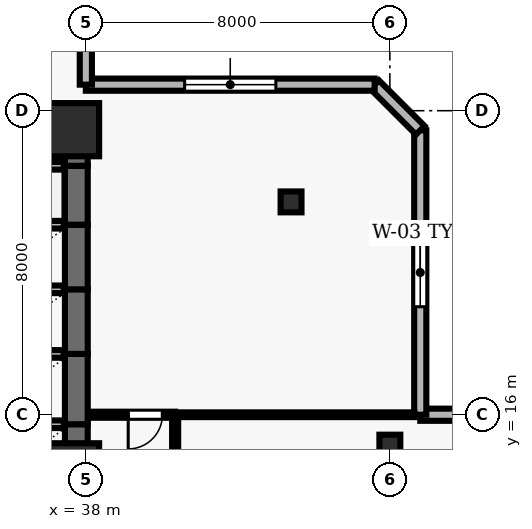
"""IFC4 building model, lengths in metres.
Left out: names, types, materials, properties, quantities, classifications, styles, units other than length and angle.
Written with IfcOpenShell. Run it as: python <this file> out.ifc"""

import sys

from ifc_helpers import new_model, si_unit, direction, frame, frame_2d, origin, origin_2d, place, context, subcontext, project, spatial, rectangle, hollow_rectangle, extrude, element, fill, save


model = new_model("IFC4")
c1 = context("Model", 3, precision=1e-05, world=origin(), true_north=direction((0.0, 1.0)))
c2 = subcontext(c1, "Body", "Model", "MODEL_VIEW")
j1 = project(units=[si_unit("LENGTHUNIT", "METRE"), si_unit("PLANEANGLEUNIT", "RADIAN")], contexts=[c1])
p1 = place(None, origin())
s1 = spatial("IfcSite", under=j1, at=p1, CompositionType="ELEMENT")
p2 = place(p1, origin())
s2 = spatial("IfcBuilding", under=s1, at=p2, CompositionType="ELEMENT")
p3 = place(p2, frame((0.0, 0.0, 89.5)))
s3 = spatial("IfcBuildingStorey", under=s2, at=p3, CompositionType="ELEMENT", Elevation=89.5)
for number, where, z_axis, x_axis in (
    (1, (37.65, 14.55, 0.0), (0.0, 0.0, 1.0), (1.0, 0.0, 0.0)),
    (2, (37.65, 23.5, 0.0), (0.0, 0.0, 1.0), (1.0, 0.0, 0.0)),
):
    element("IfcColumn", number, at=place(p3, frame(where, z_axis=z_axis, x_axis=x_axis)), inside=s3, PredefinedType="COLUMN", context=c2, shape_type="SweptSolid", body=[
        extrude(rectangle(XDim=1.4, YDim=1.4, at=origin_2d()), origin(), (0.0, 0.0, 1.0), 3.9),
    ])
for number, where, z_axis, x_axis in (
    (3, (46.0, 15.2, 0.0), (0.0, 0.0, 1.0), (1.0, 0.0, 0.0)),
    (4, (43.4, 21.6, 0.0), (0.0, 0.0, 1.0), (1.0, 0.0, 0.0)),
):
    element("IfcColumn", number, at=place(p3, frame(where, z_axis=z_axis, x_axis=x_axis)), inside=s3, PredefinedType="COLUMN", context=c2, shape_type="SweptSolid", body=[
        extrude(hollow_rectangle(XDim=0.55, YDim=0.55, WallThickness=0.025, at=origin_2d()), origin(), (0.0, 0.0, 1.0), 3.9),
    ])
p4 = place(p3, frame((73.5, 16.0, 0.0), z_axis=(0.0, 0.0, 1.0), x_axis=(-1.0, 0.0, 0.0)))
e5 = element("IfcWall", 5, at=p4, inside=s3, PredefinedType="SOLIDWALL", context=c2, shape_type="SweptSolid", body=[
    extrude(rectangle(XDim=26.7, YDim=0.32, at=frame_2d((13.35, 0.0))), origin(), (0.0, 0.0, 1.0), 3.64),
])
p5 = place(p4, frame((17.35, 0.0, 0.0)))
e6 = element("IfcOpeningElement", 6, at=p5, cuts=e5, PredefinedType="OPENING", context=c2, shape_type="SweptSolid", body=[
    extrude(rectangle(XDim=1.0, YDim=2.2, at=frame_2d((0.5, 1.1))), frame((0.0, 0.17, 0.0), z_axis=(0.0, -1.0, 0.0), x_axis=(1.0, 0.0, 0.0)), (0.0, 0.0, 1.0), 0.34),
])
p6 = place(p4, frame((2.588, 0.0, 0.9)))
e7 = element("IfcOpeningElement", 7, at=p6, cuts=e5, PredefinedType="OPENING", context=c2, shape_type="SweptSolid", body=[
    extrude(rectangle(XDim=1.5, YDim=1.6, at=frame_2d((0.75, 0.8))), frame((0.0, 0.17, 0.0), z_axis=(0.0, -1.0, 0.0), x_axis=(1.0, 0.0, 0.0)), (0.0, 0.0, 1.0), 0.34),
])
p7 = place(p3, frame((46.8, 16.0, 0.0), z_axis=(0.0, 0.0, 1.0), x_axis=(0.0, 1.0, 0.0)))
e8 = element("IfcWall", 8, at=p7, inside=s3, PredefinedType="SOLIDWALL", context=c2, shape_type="SweptSolid", body=[
    extrude(rectangle(XDim=7.485, YDim=0.32, at=frame_2d((3.743, 0.0))), origin(), (0.0, 0.0, 1.0), 3.64),
])
p8 = place(p7, frame((2.842, 0.0, 0.9)))
e9 = element("IfcOpeningElement", 9, at=p8, cuts=e8, PredefinedType="OPENING", context=c2, shape_type="SweptSolid", body=[
    extrude(rectangle(XDim=1.8, YDim=1.6, at=frame_2d((0.9, 0.8))), frame((0.0, 0.17, 0.0), z_axis=(0.0, -1.0, 0.0), x_axis=(1.0, 0.0, 0.0)), (0.0, 0.0, 1.0), 0.34),
])
p9 = place(p3, frame((46.8, 23.485, 0.0), z_axis=(0.0, 0.0, 1.0), x_axis=(-0.707106781187, 0.707106781187, 0.0)))
e10 = element("IfcWall", 10, at=p9, inside=s3, PredefinedType="SOLIDWALL", context=c2, shape_type="SweptSolid", body=[
    extrude(rectangle(XDim=1.697, YDim=0.32, at=frame_2d((0.849, 0.0))), origin(), (0.0, 0.0, 1.0), 3.64),
])
p10 = place(p3, frame((45.6, 24.685, 0.0), z_axis=(0.0, 0.0, 1.0), x_axis=(-1.0, 0.0, 0.0)))
e11 = element("IfcWall", 11, at=p10, inside=s3, PredefinedType="SOLIDWALL", context=c2, shape_type="SweptSolid", body=[
    extrude(rectangle(XDim=7.6, YDim=0.32, at=frame_2d((3.8, 0.0))), origin(), (0.0, 0.0, 1.0), 3.64),
])
p11 = place(p10, frame((2.6, 0.0, 0.9)))
e12 = element("IfcOpeningElement", 12, at=p11, cuts=e11, PredefinedType="OPENING", context=c2, shape_type="SweptSolid", body=[
    extrude(rectangle(XDim=2.4, YDim=1.6, at=frame_2d((1.2, 0.8))), frame((0.0, 0.17, 0.0), z_axis=(0.0, -1.0, 0.0), x_axis=(1.0, 0.0, 0.0)), (0.0, 0.0, 1.0), 0.34),
])
p12 = place(p3, frame((38.0, 24.685, 0.0), z_axis=(0.0, 0.0, 1.0), x_axis=(0.0, 1.0, 0.0)))
e13 = element("IfcWall", 13, at=p12, inside=s3, PredefinedType="SOLIDWALL", context=c2, shape_type="SweptSolid", body=[
    extrude(rectangle(XDim=26.815, YDim=0.32, at=frame_2d((13.407, 0.0))), origin(), (0.0, 0.0, 1.0), 3.64),
])
p13 = place(p12, frame((13.007, 0.0, 0.0)))
e14 = element("IfcOpeningElement", 14, at=p13, cuts=e13, PredefinedType="OPENING", context=c2, shape_type="SweptSolid", body=[
    extrude(rectangle(XDim=1.0, YDim=2.2, at=frame_2d((0.5, 1.1))), frame((0.0, 0.17, 0.0), z_axis=(0.0, -1.0, 0.0), x_axis=(1.0, 0.0, 0.0)), (0.0, 0.0, 1.0), 0.34),
])
p14 = place(p12, frame((2.602, 0.0, 0.9)))
e15 = element("IfcOpeningElement", 15, at=p14, cuts=e13, PredefinedType="OPENING", context=c2, shape_type="SweptSolid", body=[
    extrude(rectangle(XDim=1.5, YDim=1.8, at=frame_2d((0.75, 0.9))), frame((0.0, 0.17, 0.0), z_axis=(0.0, -1.0, 0.0), x_axis=(1.0, 0.0, 0.0)), (0.0, 0.0, 1.0), 0.34),
])
p15 = place(p12, frame((8.856, 0.0, 0.9)))
e16 = element("IfcOpeningElement", 16, at=p15, cuts=e13, PredefinedType="OPENING", context=c2, shape_type="SweptSolid", body=[
    extrude(rectangle(XDim=1.5, YDim=1.8, at=frame_2d((0.75, 0.9))), frame((0.0, 0.17, 0.0), z_axis=(0.0, -1.0, 0.0), x_axis=(1.0, 0.0, 0.0)), (0.0, 0.0, 1.0), 0.34),
])
p16 = place(p12, frame((22.713, 0.0, 0.9)))
e17 = element("IfcOpeningElement", 17, at=p16, cuts=e13, PredefinedType="OPENING", context=c2, shape_type="SweptSolid", body=[
    extrude(rectangle(XDim=1.5, YDim=1.8, at=frame_2d((0.75, 0.9))), frame((0.0, 0.17, 0.0), z_axis=(0.0, -1.0, 0.0), x_axis=(1.0, 0.0, 0.0)), (0.0, 0.0, 1.0), 0.34),
])
p17 = place(p3, frame((37.75, 13.9, 0.0), z_axis=(0.0, 0.0, 1.0), x_axis=(0.0, 1.0, 0.0)))
e18 = element("IfcWall", 18, at=p17, inside=s3, PredefinedType="SHEAR", context=c2, shape_type="SweptSolid", body=[
    extrude(rectangle(XDim=1.85, YDim=0.6, at=frame_2d((0.925, 0.0))), origin(), (0.0, 0.0, 1.0), 3.64),
])
p18 = place(p3, frame((37.42, 15.75, 0.0), z_axis=(0.0, 0.0, 1.0), x_axis=(-1.0, 0.0, 0.0)))
e19 = element("IfcWall", 19, at=p18, inside=s3, PredefinedType="SOLIDWALL", context=c2, shape_type="SweptSolid", body=[
    extrude(rectangle(XDim=2.14, YDim=0.2, at=frame_2d((1.07, 0.0))), origin(), (0.0, 0.0, 1.0), 3.64),
])
p19 = place(p3, frame((37.75, 15.75, 0.0), z_axis=(0.0, 0.0, 1.0), x_axis=(0.0, 1.0, 0.0)))
e20 = element("IfcWall", 20, at=p19, inside=s3, PredefinedType="SHEAR", context=c2, shape_type="SweptSolid", body=[
    extrude(rectangle(XDim=1.85, YDim=0.6, at=frame_2d((0.925, 0.0))), origin(), (0.0, 0.0, 1.0), 3.64),
])
p20 = place(p3, frame((37.42, 17.6, 0.0), z_axis=(0.0, 0.0, 1.0), x_axis=(-1.0, 0.0, 0.0)))
e21 = element("IfcWall", 21, at=p20, inside=s3, PredefinedType="SOLIDWALL", context=c2, shape_type="SweptSolid", body=[
    extrude(rectangle(XDim=2.14, YDim=0.2, at=frame_2d((1.07, 0.0))), origin(), (0.0, 0.0, 1.0), 3.64),
])
p21 = place(p3, frame((37.75, 17.6, 0.0), z_axis=(0.0, 0.0, 1.0), x_axis=(0.0, 1.0, 0.0)))
e22 = element("IfcWall", 22, at=p21, inside=s3, PredefinedType="SHEAR", context=c2, shape_type="SweptSolid", body=[
    extrude(rectangle(XDim=1.7, YDim=0.6, at=frame_2d((0.85, 0.0))), origin(), (0.0, 0.0, 1.0), 3.64),
])
p22 = place(p3, frame((37.42, 19.3, 0.0), z_axis=(0.0, 0.0, 1.0), x_axis=(-1.0, 0.0, 0.0)))
e23 = element("IfcWall", 23, at=p22, inside=s3, PredefinedType="SOLIDWALL", context=c2, shape_type="SweptSolid", body=[
    extrude(rectangle(XDim=2.14, YDim=0.2, at=frame_2d((1.07, 0.0))), origin(), (0.0, 0.0, 1.0), 3.64),
])
p23 = place(p3, frame((37.75, 19.3, 0.0), z_axis=(0.0, 0.0, 1.0), x_axis=(0.0, 1.0, 0.0)))
e24 = element("IfcWall", 24, at=p23, inside=s3, PredefinedType="SHEAR", context=c2, shape_type="SweptSolid", body=[
    extrude(rectangle(XDim=1.7, YDim=0.6, at=frame_2d((0.85, 0.0))), origin(), (0.0, 0.0, 1.0), 3.64),
])
p24 = place(p3, frame((37.42, 21.0, 0.0), z_axis=(0.0, 0.0, 1.0), x_axis=(-1.0, 0.0, 0.0)))
e25 = element("IfcWall", 25, at=p24, inside=s3, PredefinedType="SOLIDWALL", context=c2, shape_type="SweptSolid", body=[
    extrude(rectangle(XDim=2.14, YDim=0.2, at=frame_2d((1.07, 0.0))), origin(), (0.0, 0.0, 1.0), 3.64),
])
p25 = place(p3, frame((37.75, 21.0, 0.0), z_axis=(0.0, 0.0, 1.0), x_axis=(0.0, 1.0, 0.0)))
e26 = element("IfcWall", 26, at=p25, inside=s3, PredefinedType="SHEAR", context=c2, shape_type="SweptSolid", body=[
    extrude(rectangle(XDim=1.55, YDim=0.6, at=frame_2d((0.775, 0.0))), origin(), (0.0, 0.0, 1.0), 3.64),
])
p26 = place(p3, frame((37.42, 22.55, 0.0), z_axis=(0.0, 0.0, 1.0), x_axis=(-1.0, 0.0, 0.0)))
e27 = element("IfcWall", 27, at=p26, inside=s3, PredefinedType="SOLIDWALL", context=c2, shape_type="SweptSolid", body=[
    extrude(rectangle(XDim=2.14, YDim=0.2, at=frame_2d((1.07, 0.0))), origin(), (0.0, 0.0, 1.0), 3.64),
])
p27 = place(p3, frame((37.75, 22.55, 0.0), z_axis=(0.0, 0.0, 1.0), x_axis=(0.0, 1.0, 0.0)))
e28 = element("IfcWall", 28, at=p27, inside=s3, PredefinedType="SHEAR", context=c2, shape_type="SweptSolid", body=[
    extrude(rectangle(XDim=1.5, YDim=0.6, at=frame_2d((0.75, 0.0))), origin(), (0.0, 0.0, 1.0), 3.64),
])
p28 = place(p3, frame((37.42, 24.05, 0.0), z_axis=(0.0, 0.0, 1.0), x_axis=(-1.0, 0.0, 0.0)))
e29 = element("IfcWall", 29, at=p28, inside=s3, PredefinedType="SOLIDWALL", context=c2, shape_type="SweptSolid", body=[
    extrude(rectangle(XDim=2.14, YDim=0.2, at=frame_2d((1.07, 0.0))), origin(), (0.0, 0.0, 1.0), 3.64),
])
p29 = place(p3, frame((40.35, 16.0, 0.0), z_axis=(0.0, 0.0, 1.0), x_axis=(1.0, 0.0, 0.0)))
e30 = element("IfcWall", 30, at=p29, inside=s3, PredefinedType="PARTITIONING", context=c2, shape_type="SweptSolid", body=[
    extrude(rectangle(XDim=6.295, YDim=0.125, at=frame_2d((3.147, 0.0))), origin(), (0.0, 0.0, 1.0), 3.64),
])
p30 = place(p3, frame((40.35, 16.0, 0.0), z_axis=(0.0, 0.0, 1.0), x_axis=(-1.0, 0.0, 0.0)))
e31 = element("IfcWall", 31, at=p30, inside=s3, PredefinedType="PARTITIONING", context=c2, shape_type="SweptSolid", body=[
    extrude(rectangle(XDim=2.27, YDim=0.16, at=frame_2d((1.135, 0.0))), origin(), (0.0, 0.0, 1.0), 3.64),
])
p31 = place(p30, frame((0.335, 0.0, 0.0)))
e32 = element("IfcOpeningElement", 32, at=p31, cuts=e31, PredefinedType="OPENING", context=c2, shape_type="SweptSolid", body=[
    extrude(rectangle(XDim=0.9, YDim=2.1, at=frame_2d((0.45, 1.05))), frame((0.0, 0.09, 0.0), z_axis=(0.0, -1.0, 0.0), x_axis=(1.0, 0.0, 0.0)), (0.0, 0.0, 1.0), 0.18),
])
p32 = place(p3, frame((40.35, 10.425, 0.0), z_axis=(0.0, 0.0, 1.0), x_axis=(0.0, 1.0, 0.0)))
e33 = element("IfcWall", 33, at=p32, inside=s3, PredefinedType="PARTITIONING", context=c2, shape_type="SweptSolid", body=[
    extrude(rectangle(XDim=5.5, YDim=0.16, at=frame_2d((2.75, 0.0))), origin(), (0.0, 0.0, 1.0), 3.227),
])
p33 = place(p8, origin())
e34 = element("IfcWindow", 34, at=p33, inside=s3, PartitioningType="SINGLE_PANEL", PredefinedType="WINDOW", context=c2, shape_type="SweptSolid", body=[
    extrude(rectangle(XDim=1.8, YDim=1.6, at=frame_2d((0.9, 0.8))), frame((0.0, 0.03, 0.0), z_axis=(0.0, -1.0, 0.0), x_axis=(1.0, 0.0, 0.0)), (0.0, 0.0, 1.0), 0.06),
])
fill(e9, e34)
p34 = place(p11, origin())
e35 = element("IfcWindow", 35, at=p34, inside=s3, PartitioningType="SINGLE_PANEL", PredefinedType="WINDOW", context=c2, shape_type="SweptSolid", body=[
    extrude(rectangle(XDim=2.4, YDim=1.6, at=frame_2d((1.2, 0.8))), frame((0.0, 0.03, 0.0), z_axis=(0.0, -1.0, 0.0), x_axis=(1.0, 0.0, 0.0)), (0.0, 0.0, 1.0), 0.06),
])
fill(e12, e35)
p35 = place(p31, origin())
e36 = element("IfcDoor", 36, at=p35, inside=s3, OperationType="SINGLE_SWING_RIGHT", PredefinedType="DOOR", context=c2, shape_type="SweptSolid", body=[
    extrude(rectangle(XDim=0.9, YDim=2.1, at=frame_2d((0.45, 1.05))), frame((0.0, 0.025, 0.0), z_axis=(0.0, -1.0, 0.0), x_axis=(1.0, 0.0, 0.0)), (0.0, 0.0, 1.0), 0.05),
])
fill(e32, e36)
save(model, sys.argv[1])
